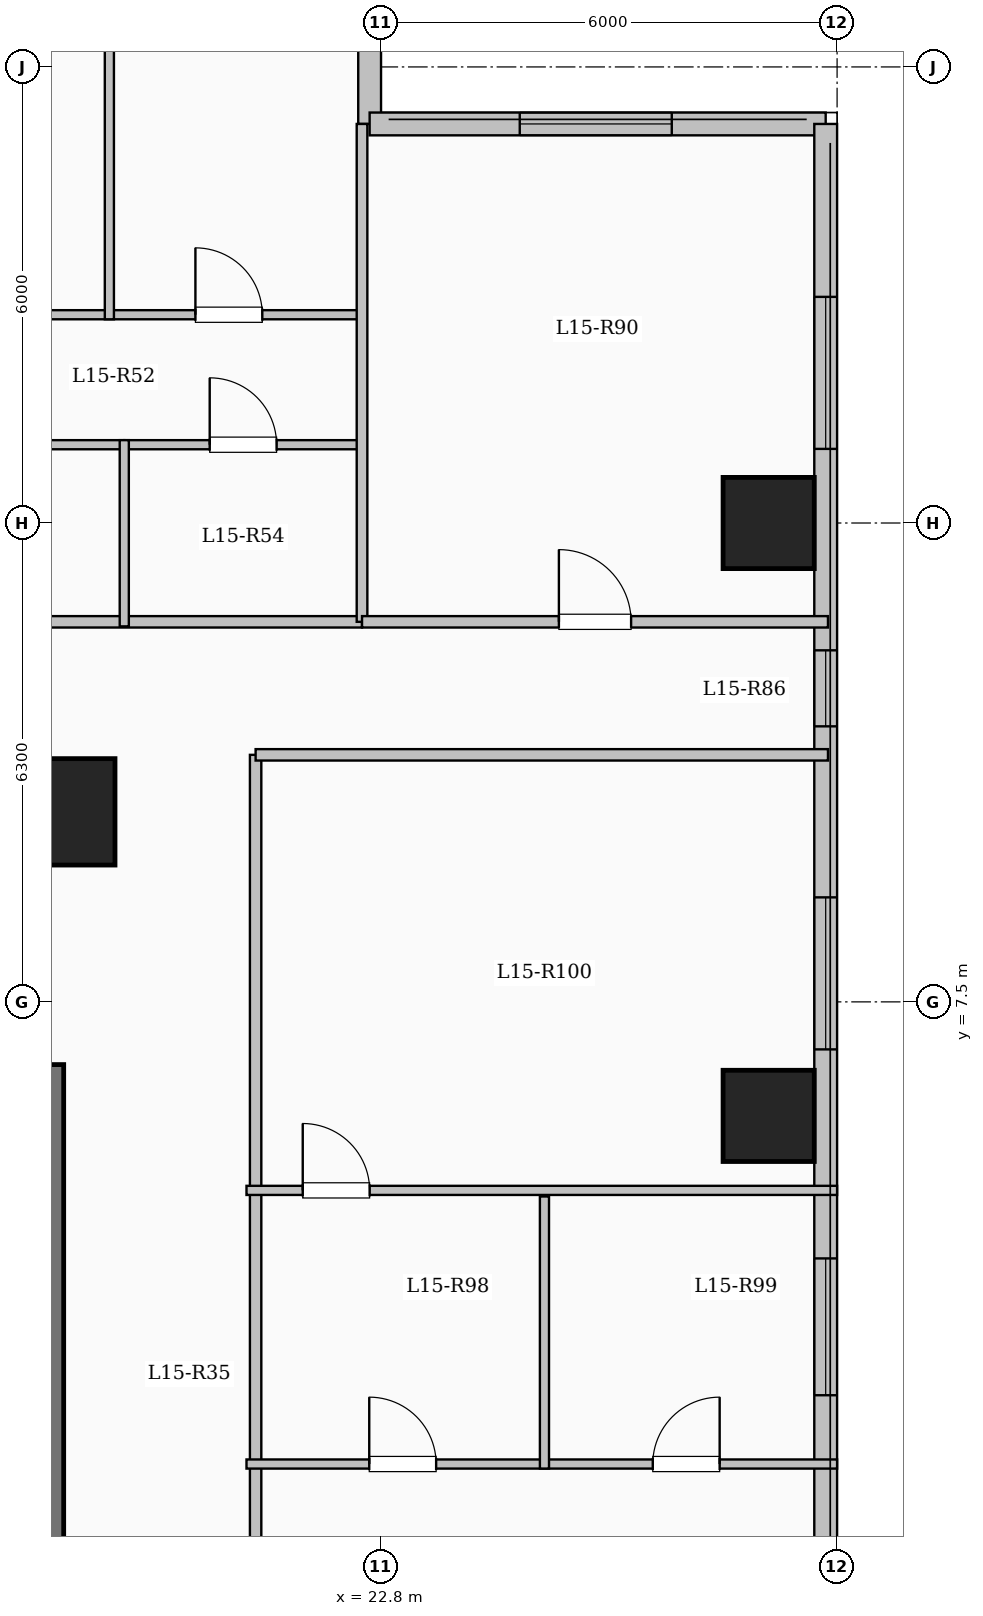
"""IFC4 building model, lengths in metres.
Left out: names, types, materials, properties, quantities, classifications, styles, units other than length and angle.
Written with IfcOpenShell. Run it as: python <this file> out.ifc"""

import sys

from ifc_helpers import new_model, si_unit, direction, frame, frame_2d, origin, origin_2d, place, context, subcontext, project, spatial, rectangle, extrude, element, fill, save


model = new_model("IFC4")
c1 = context("Model", 3, precision=1e-05, world=origin(), true_north=direction((0.0, 1.0)))
c2 = subcontext(c1, "Body", "Model", "MODEL_VIEW")
j1 = project(units=[si_unit("LENGTHUNIT", "METRE"), si_unit("PLANEANGLEUNIT", "RADIAN")], contexts=[c1])
p1 = place(None, origin())
s1 = spatial("IfcSite", under=j1, at=p1, CompositionType="ELEMENT")
p2 = place(p1, origin())
s2 = spatial("IfcBuilding", under=s1, at=p2, CompositionType="ELEMENT")
p3 = place(p2, frame((0.0, 0.0, 57.5)))
s3 = spatial("IfcBuildingStorey", under=s2, at=p3, CompositionType="ELEMENT", Elevation=57.5)
p4 = place(p3, frame((18.6, 10.0, 0.0), z_axis=(0.0, 0.0, 1.0), x_axis=(1.0, 0.0, 0.0)))
e1 = element("IfcColumn", 1, at=p4, inside=s3, PredefinedType="COLUMN", context=c2, shape_type="SweptSolid", body=[
    extrude(rectangle(XDim=1.4, YDim=1.4, at=origin_2d()), origin(), (0.0, 0.0, 1.0), 3.35),
])
for number, where, z_axis, x_axis in (
    (2, (27.9, 6.0, 0.0), (0.0, 0.0, 1.0), (1.0, 0.0, 0.0)),
    (3, (27.9, 13.8, 0.0), (0.0, 0.0, 1.0), (1.0, 0.0, 0.0)),
):
    element("IfcColumn", number, at=place(p3, frame(where, z_axis=z_axis, x_axis=x_axis)), inside=s3, PredefinedType="COLUMN", context=c2, shape_type="SweptSolid", body=[
        extrude(rectangle(XDim=1.2, YDim=1.2, at=origin_2d()), origin(), (0.0, 0.0, 1.0), 3.35),
    ])
p5 = place(p3, frame((22.65, 23.55, 0.0), z_axis=(0.0, 0.0, 1.0), x_axis=(0.0, -1.0, 0.0)))
e4 = element("IfcWall", 4, at=p5, inside=s3, PredefinedType="SOLIDWALL", context=c2, shape_type="SweptSolid", body=[
    extrude(rectangle(XDim=4.5, YDim=0.3, at=frame_2d((2.25, 0.0))), origin(), (0.0, 0.0, 1.0), 3.1),
])
p6 = place(p5, frame((1.367, 0.0, 0.9)))
e5 = element("IfcOpeningElement", 5, at=p6, cuts=e4, PredefinedType="OPENING", context=c2, shape_type="SweptSolid", body=[
    extrude(rectangle(XDim=1.8, YDim=1.65, at=frame_2d((0.9, 0.825))), frame((0.0, 0.16, 0.0), z_axis=(0.0, -1.0, 0.0), x_axis=(1.0, 0.0, 0.0)), (0.0, 0.0, 1.0), 0.32),
])
p7 = place(p3, frame((22.65, 19.05, 0.0), z_axis=(0.0, 0.0, 1.0), x_axis=(1.0, 0.0, 0.0)))
e6 = element("IfcWall", 6, at=p7, inside=s3, PredefinedType="SOLIDWALL", context=c2, shape_type="SweptSolid", body=[
    extrude(rectangle(XDim=6.0, YDim=0.3, at=frame_2d((3.0, 0.0))), origin(), (0.0, 0.0, 1.0), 3.1),
])
p8 = place(p7, frame((1.975, 0.0, 0.9)))
e7 = element("IfcOpeningElement", 7, at=p8, cuts=e6, PredefinedType="OPENING", context=c2, shape_type="SweptSolid", body=[
    extrude(rectangle(XDim=2.0, YDim=1.7, at=frame_2d((1.0, 0.85))), frame((0.0, 0.16, 0.0), z_axis=(0.0, -1.0, 0.0), x_axis=(1.0, 0.0, 0.0)), (0.0, 0.0, 1.0), 0.32),
])
p9 = place(p3, frame((28.65, 19.05, 0.0), z_axis=(0.0, 0.0, 1.0), x_axis=(0.0, -1.0, 0.0)))
e8 = element("IfcWall", 8, at=p9, inside=s3, PredefinedType="SOLIDWALL", context=c2, shape_type="SweptSolid", body=[
    extrude(rectangle(XDim=38.1, YDim=0.3, at=frame_2d((19.05, 0.0))), origin(), (0.0, 0.0, 1.0), 3.1),
])
p10 = place(p9, frame((2.275, 0.0, 0.9)))
e9 = element("IfcOpeningElement", 9, at=p10, cuts=e8, PredefinedType="OPENING", context=c2, shape_type="SweptSolid", body=[
    extrude(rectangle(XDim=2.0, YDim=1.7, at=frame_2d((1.0, 0.85))), frame((0.0, 0.16, 0.0), z_axis=(0.0, -1.0, 0.0), x_axis=(1.0, 0.0, 0.0)), (0.0, 0.0, 1.0), 0.32),
])
p11 = place(p9, frame((6.925, 0.0, 0.95)))
e10 = element("IfcOpeningElement", 10, at=p11, cuts=e8, PredefinedType="OPENING", context=c2, shape_type="SweptSolid", body=[
    extrude(rectangle(XDim=1.0, YDim=1.5, at=frame_2d((0.5, 0.75))), frame((0.0, 0.16, 0.0), z_axis=(0.0, -1.0, 0.0), x_axis=(1.0, 0.0, 0.0)), (0.0, 0.0, 1.0), 0.32),
])
p12 = place(p9, frame((10.175, 0.0, 0.9)))
e11 = element("IfcOpeningElement", 11, at=p12, cuts=e8, PredefinedType="OPENING", context=c2, shape_type="SweptSolid", body=[
    extrude(rectangle(XDim=2.0, YDim=1.7, at=frame_2d((1.0, 0.85))), frame((0.0, 0.16, 0.0), z_axis=(0.0, -1.0, 0.0), x_axis=(1.0, 0.0, 0.0)), (0.0, 0.0, 1.0), 0.32),
])
p13 = place(p9, frame((14.925, 0.0, 0.9)))
e12 = element("IfcOpeningElement", 12, at=p13, cuts=e8, PredefinedType="OPENING", context=c2, shape_type="SweptSolid", body=[
    extrude(rectangle(XDim=1.8, YDim=1.65, at=frame_2d((0.9, 0.825))), frame((0.0, 0.16, 0.0), z_axis=(0.0, -1.0, 0.0), x_axis=(1.0, 0.0, 0.0)), (0.0, 0.0, 1.0), 0.32),
])
p14 = place(p9, frame((20.75, 0.0, 0.9)))
e13 = element("IfcOpeningElement", 13, at=p14, cuts=e8, PredefinedType="OPENING", context=c2, shape_type="SweptSolid", body=[
    extrude(rectangle(XDim=2.4, YDim=1.8, at=frame_2d((1.2, 0.9))), frame((0.0, 0.16, 0.0), z_axis=(0.0, -1.0, 0.0), x_axis=(1.0, 0.0, 0.0)), (0.0, 0.0, 1.0), 0.32),
])
p15 = place(p9, frame((27.058, 0.0, 0.9)))
e14 = element("IfcOpeningElement", 14, at=p15, cuts=e8, PredefinedType="OPENING", context=c2, shape_type="SweptSolid", body=[
    extrude(rectangle(XDim=1.5, YDim=1.65, at=frame_2d((0.75, 0.825))), frame((0.0, 0.16, 0.0), z_axis=(0.0, -1.0, 0.0), x_axis=(1.0, 0.0, 0.0)), (0.0, 0.0, 1.0), 0.32),
])
p16 = place(p9, frame((32.55, 0.0, 0.9)))
e15 = element("IfcOpeningElement", 15, at=p16, cuts=e8, PredefinedType="OPENING", context=c2, shape_type="SweptSolid", body=[
    extrude(rectangle(XDim=2.4, YDim=1.8, at=frame_2d((1.2, 0.9))), frame((0.0, 0.16, 0.0), z_axis=(0.0, -1.0, 0.0), x_axis=(1.0, 0.0, 0.0)), (0.0, 0.0, 1.0), 0.32),
])
p17 = place(p3, frame((18.45, -7.375, 0.0), z_axis=(0.0, 0.0, 1.0), x_axis=(0.0, 1.0, 0.0)))
e16 = element("IfcWall", 16, at=p17, inside=s3, PredefinedType="SHEAR", context=c2, shape_type="SweptSolid", body=[
    extrude(rectangle(XDim=14.05, YDim=0.35, at=frame_2d((7.025, 0.0))), origin(), (0.0, 0.0, 1.0), 3.35),
])
p18 = place(p3, frame((3.85, 12.5, 0.0), z_axis=(0.0, 0.0, 1.0), x_axis=(1.0, 0.0, 0.0)))
e17 = element("IfcWall", 17, at=p18, inside=s3, PredefinedType="PARTITIONING", context=c2, shape_type="SweptSolid", body=[
    extrude(rectangle(XDim=18.7, YDim=0.15, at=frame_2d((9.35, 0.0))), origin(), (0.0, 0.0, 1.0), 3.1),
])
p19 = place(p18, frame((0.7, 0.0, 0.0)))
e18 = element("IfcOpeningElement", 18, at=p19, cuts=e17, PredefinedType="OPENING", context=c2, shape_type="SweptSolid", body=[
    extrude(rectangle(XDim=0.96, YDim=2.15, at=frame_2d((0.48, 1.075))), frame((0.0, 0.085, 0.0), z_axis=(0.0, -1.0, 0.0), x_axis=(1.0, 0.0, 0.0)), (0.0, 0.0, 1.0), 0.17),
])
p20 = place(p18, frame((8.4, 0.0, 0.0)))
e19 = element("IfcOpeningElement", 19, at=p20, cuts=e17, PredefinedType="OPENING", context=c2, shape_type="SweptSolid", body=[
    extrude(rectangle(XDim=0.96, YDim=2.15, at=frame_2d((0.48, 1.075))), frame((0.0, 0.085, 0.0), z_axis=(0.0, -1.0, 0.0), x_axis=(1.0, 0.0, 0.0)), (0.0, 0.0, 1.0), 0.17),
])
p21 = place(p3, frame((21.15, -7.25, 0.0), z_axis=(0.0, 0.0, 1.0), x_axis=(0.0, 1.0, 0.0)))
e20 = element("IfcWall", 20, at=p21, inside=s3, PredefinedType="PARTITIONING", context=c2, shape_type="SweptSolid", body=[
    extrude(rectangle(XDim=18.0, YDim=0.15, at=frame_2d((9.0, 0.0))), origin(), (0.0, 0.0, 1.0), 2.585),
])
p22 = place(p3, frame((15.962, 14.83, 0.0), z_axis=(0.0, 0.0, 1.0), x_axis=(1.0, 0.0, 0.0)))
e21 = element("IfcWall", 21, at=p22, inside=s3, PredefinedType="PARTITIONING", context=c2, shape_type="SweptSolid", body=[
    extrude(rectangle(XDim=3.46, YDim=0.12, at=frame_2d((1.73, 0.0))), origin(), (0.0, 0.0, 1.0), 3.1),
])
p23 = place(p22, frame((1.29, 0.0, 0.0)))
e22 = element("IfcOpeningElement", 22, at=p23, cuts=e21, PredefinedType="OPENING", context=c2, shape_type="SweptSolid", body=[
    extrude(rectangle(XDim=0.88, YDim=2.1, at=frame_2d((0.44, 1.05))), frame((0.0, 0.07, 0.0), z_axis=(0.0, -1.0, 0.0), x_axis=(1.0, 0.0, 0.0)), (0.0, 0.0, 1.0), 0.14),
])
p24 = place(p3, frame((19.422, 14.83, 0.0), z_axis=(0.0, 0.0, 1.0), x_axis=(1.0, 0.0, 0.0)))
e23 = element("IfcWall", 23, at=p24, inside=s3, PredefinedType="PARTITIONING", context=c2, shape_type="SweptSolid", body=[
    extrude(rectangle(XDim=3.128, YDim=0.12, at=frame_2d((1.564, 0.0))), origin(), (0.0, 0.0, 1.0), 3.1),
])
p25 = place(p24, frame((1.124, 0.0, 0.0)))
e24 = element("IfcOpeningElement", 24, at=p25, cuts=e23, PredefinedType="OPENING", context=c2, shape_type="SweptSolid", body=[
    extrude(rectangle(XDim=0.88, YDim=2.1, at=frame_2d((0.44, 1.05))), frame((0.0, 0.07, 0.0), z_axis=(0.0, -1.0, 0.0), x_axis=(1.0, 0.0, 0.0)), (0.0, 0.0, 1.0), 0.14),
])
p26 = place(p3, frame((15.902, 16.54, 0.0), z_axis=(0.0, 0.0, 1.0), x_axis=(1.0, 0.0, 0.0)))
e25 = element("IfcWall", 25, at=p26, inside=s3, PredefinedType="PARTITIONING", context=c2, shape_type="SweptSolid", body=[
    extrude(rectangle(XDim=6.708, YDim=0.12, at=frame_2d((3.354, 0.0))), origin(), (0.0, 0.0, 1.0), 3.1),
])
p27 = place(p26, frame((1.192, 0.0, 0.0)))
e26 = element("IfcOpeningElement", 26, at=p27, cuts=e25, PredefinedType="OPENING", context=c2, shape_type="SweptSolid", body=[
    extrude(rectangle(XDim=0.88, YDim=2.1, at=frame_2d((0.44, 1.05))), frame((0.0, 0.07, 0.0), z_axis=(0.0, -1.0, 0.0), x_axis=(1.0, 0.0, 0.0)), (0.0, 0.0, 1.0), 0.14),
])
p28 = place(p26, frame((4.456, 0.0, 0.0)))
e27 = element("IfcOpeningElement", 27, at=p28, cuts=e25, PredefinedType="OPENING", context=c2, shape_type="SweptSolid", body=[
    extrude(rectangle(XDim=0.88, YDim=2.1, at=frame_2d((0.44, 1.05))), frame((0.0, 0.07, 0.0), z_axis=(0.0, -1.0, 0.0), x_axis=(1.0, 0.0, 0.0)), (0.0, 0.0, 1.0), 0.14),
])
p29 = place(p3, frame((19.422, 12.44, 0.0), z_axis=(0.0, 0.0, 1.0), x_axis=(0.0, 1.0, 0.0)))
e28 = element("IfcWall", 28, at=p29, inside=s3, PredefinedType="PARTITIONING", context=c2, shape_type="SweptSolid", body=[
    extrude(rectangle(XDim=2.45, YDim=0.12, at=frame_2d((1.225, 0.0))), origin(), (0.0, 0.0, 1.0), 3.1),
])
p30 = place(p3, frame((19.226, 16.48, 0.0), z_axis=(0.0, 0.0, 1.0), x_axis=(0.0, 1.0, 0.0)))
e29 = element("IfcWall", 29, at=p30, inside=s3, PredefinedType="PARTITIONING", context=c2, shape_type="SweptSolid", body=[
    extrude(rectangle(XDim=7.12, YDim=0.12, at=frame_2d((3.56, 0.0))), origin(), (0.0, 0.0, 1.0), 3.1),
])
p31 = place(p3, frame((21.15, 10.75, 0.0), z_axis=(0.0, 0.0, 1.0), x_axis=(1.0, 0.0, 0.0)))
e30 = element("IfcWall", 30, at=p31, inside=s3, PredefinedType="PARTITIONING", context=c2, shape_type="SweptSolid", body=[
    extrude(rectangle(XDim=7.53, YDim=0.15, at=frame_2d((3.765, 0.0))), origin(), (0.0, 0.0, 1.0), 3.1),
])
p32 = place(p3, frame((22.55, 12.5, 0.0), z_axis=(0.0, 0.0, 1.0), x_axis=(0.0, 1.0, 0.0)))
e31 = element("IfcWall", 31, at=p32, inside=s3, PredefinedType="PARTITIONING", context=c2, shape_type="SweptSolid", body=[
    extrude(rectangle(XDim=6.55, YDim=0.14, at=frame_2d((3.275, 0.0))), origin(), (0.0, 0.0, 1.0), 3.1),
])
p33 = place(p3, frame((22.55, 12.5, 0.0), z_axis=(0.0, 0.0, 1.0), x_axis=(1.0, 0.0, 0.0)))
e32 = element("IfcWall", 32, at=p33, inside=s3, PredefinedType="PARTITIONING", context=c2, shape_type="SweptSolid", body=[
    extrude(rectangle(XDim=6.13, YDim=0.15, at=frame_2d((3.065, 0.0))), origin(), (0.0, 0.0, 1.0), 3.1),
])
p34 = place(p33, frame((2.59, 0.0, 0.0)))
e33 = element("IfcOpeningElement", 33, at=p34, cuts=e32, PredefinedType="OPENING", context=c2, shape_type="SweptSolid", body=[
    extrude(rectangle(XDim=0.95, YDim=2.15, at=frame_2d((0.475, 1.075))), frame((0.0, 0.085, 0.0), z_axis=(0.0, -1.0, 0.0), x_axis=(1.0, 0.0, 0.0)), (0.0, 0.0, 1.0), 0.17),
])
p35 = place(p3, frame((21.03, 1.42, 0.0), z_axis=(0.0, 0.0, 1.0), x_axis=(1.0, 0.0, 0.0)))
e34 = element("IfcWall", 34, at=p35, inside=s3, PredefinedType="PARTITIONING", context=c2, shape_type="SweptSolid", body=[
    extrude(rectangle(XDim=7.77, YDim=0.12, at=frame_2d((3.885, 0.0))), origin(), (0.0, 0.0, 1.0), 3.1),
])
p36 = place(p35, frame((1.615, 0.0, 0.0)))
e35 = element("IfcOpeningElement", 35, at=p36, cuts=e34, PredefinedType="OPENING", context=c2, shape_type="SweptSolid", body=[
    extrude(rectangle(XDim=0.88, YDim=2.1, at=frame_2d((0.44, 1.05))), frame((0.0, 0.07, 0.0), z_axis=(0.0, -1.0, 0.0), x_axis=(1.0, 0.0, 0.0)), (0.0, 0.0, 1.0), 0.14),
])
p37 = place(p35, frame((5.345, 0.0, 0.0)))
e36 = element("IfcOpeningElement", 36, at=p37, cuts=e34, PredefinedType="OPENING", context=c2, shape_type="SweptSolid", body=[
    extrude(rectangle(XDim=0.88, YDim=2.1, at=frame_2d((0.44, 1.05))), frame((0.0, 0.07, 0.0), z_axis=(0.0, -1.0, 0.0), x_axis=(1.0, 0.0, 0.0)), (0.0, 0.0, 1.0), 0.14),
])
p38 = place(p3, frame((21.03, 5.02, 0.0), z_axis=(0.0, 0.0, 1.0), x_axis=(1.0, 0.0, 0.0)))
e37 = element("IfcWall", 37, at=p38, inside=s3, PredefinedType="PARTITIONING", context=c2, shape_type="SweptSolid", body=[
    extrude(rectangle(XDim=7.77, YDim=0.12, at=frame_2d((3.885, 0.0))), origin(), (0.0, 0.0, 1.0), 3.1),
])
p39 = place(p38, frame((0.74, 0.0, 0.0)))
e38 = element("IfcOpeningElement", 38, at=p39, cuts=e37, PredefinedType="OPENING", context=c2, shape_type="SweptSolid", body=[
    extrude(rectangle(XDim=0.88, YDim=2.1, at=frame_2d((0.44, 1.05))), frame((0.0, 0.07, 0.0), z_axis=(0.0, -1.0, 0.0), x_axis=(1.0, 0.0, 0.0)), (0.0, 0.0, 1.0), 0.14),
])
p40 = place(p3, frame((24.95, 1.36, 0.0), z_axis=(0.0, 0.0, 1.0), x_axis=(0.0, 1.0, 0.0)))
e39 = element("IfcWall", 39, at=p40, inside=s3, PredefinedType="PARTITIONING", context=c2, shape_type="SweptSolid", body=[
    extrude(rectangle(XDim=3.58, YDim=0.12, at=frame_2d((1.79, 0.0))), origin(), (0.0, 0.0, 1.0), 3.1),
])
p41 = place(p8, origin())
e40 = element("IfcWindow", 40, at=p41, inside=s3, PartitioningType="SINGLE_PANEL", PredefinedType="WINDOW", context=c2, shape_type="SweptSolid", body=[
    extrude(rectangle(XDim=2.0, YDim=1.7, at=frame_2d((1.0, 0.85))), frame((0.0, 0.03, 0.0), z_axis=(0.0, -1.0, 0.0), x_axis=(1.0, 0.0, 0.0)), (0.0, 0.0, 1.0), 0.06),
])
fill(e7, e40)
p42 = place(p10, origin())
e41 = element("IfcWindow", 41, at=p42, inside=s3, PartitioningType="SINGLE_PANEL", PredefinedType="WINDOW", context=c2, shape_type="SweptSolid", body=[
    extrude(rectangle(XDim=2.0, YDim=1.7, at=frame_2d((1.0, 0.85))), frame((0.0, 0.03, 0.0), z_axis=(0.0, -1.0, 0.0), x_axis=(1.0, 0.0, 0.0)), (0.0, 0.0, 1.0), 0.06),
])
fill(e9, e41)
p43 = place(p11, origin())
e42 = element("IfcWindow", 42, at=p43, inside=s3, PartitioningType="SINGLE_PANEL", PredefinedType="WINDOW", context=c2, shape_type="SweptSolid", body=[
    extrude(rectangle(XDim=1.0, YDim=1.5, at=frame_2d((0.5, 0.75))), frame((0.0, 0.03, 0.0), z_axis=(0.0, -1.0, 0.0), x_axis=(1.0, 0.0, 0.0)), (0.0, 0.0, 1.0), 0.06),
])
fill(e10, e42)
p44 = place(p12, origin())
e43 = element("IfcWindow", 43, at=p44, inside=s3, PartitioningType="SINGLE_PANEL", PredefinedType="WINDOW", context=c2, shape_type="SweptSolid", body=[
    extrude(rectangle(XDim=2.0, YDim=1.7, at=frame_2d((1.0, 0.85))), frame((0.0, 0.03, 0.0), z_axis=(0.0, -1.0, 0.0), x_axis=(1.0, 0.0, 0.0)), (0.0, 0.0, 1.0), 0.06),
])
fill(e11, e43)
p45 = place(p13, origin())
e44 = element("IfcWindow", 44, at=p45, inside=s3, PartitioningType="SINGLE_PANEL", PredefinedType="WINDOW", context=c2, shape_type="SweptSolid", body=[
    extrude(rectangle(XDim=1.8, YDim=1.65, at=frame_2d((0.9, 0.825))), frame((0.0, 0.03, 0.0), z_axis=(0.0, -1.0, 0.0), x_axis=(1.0, 0.0, 0.0)), (0.0, 0.0, 1.0), 0.06),
])
fill(e12, e44)
p46 = place(p25, origin())
e45 = element("IfcDoor", 45, at=p46, inside=s3, OperationType="SINGLE_SWING_LEFT", PredefinedType="DOOR", context=c2, shape_type="SweptSolid", body=[
    extrude(rectangle(XDim=0.88, YDim=2.1, at=frame_2d((0.44, 1.05))), frame((0.0, 0.025, 0.0), z_axis=(0.0, -1.0, 0.0), x_axis=(1.0, 0.0, 0.0)), (0.0, 0.0, 1.0), 0.05),
])
fill(e24, e45)
p47 = place(p28, origin())
e46 = element("IfcDoor", 46, at=p47, inside=s3, OperationType="SINGLE_SWING_LEFT", PredefinedType="DOOR", context=c2, shape_type="SweptSolid", body=[
    extrude(rectangle(XDim=0.88, YDim=2.1, at=frame_2d((0.44, 1.05))), frame((0.0, 0.025, 0.0), z_axis=(0.0, -1.0, 0.0), x_axis=(1.0, 0.0, 0.0)), (0.0, 0.0, 1.0), 0.05),
])
fill(e27, e46)
p48 = place(p34, origin())
e47 = element("IfcDoor", 47, at=p48, inside=s3, OperationType="SINGLE_SWING_LEFT", PredefinedType="DOOR", context=c2, shape_type="SweptSolid", body=[
    extrude(rectangle(XDim=0.95, YDim=2.15, at=frame_2d((0.475, 1.075))), frame((0.0, 0.025, 0.0), z_axis=(0.0, -1.0, 0.0), x_axis=(1.0, 0.0, 0.0)), (0.0, 0.0, 1.0), 0.05),
])
fill(e33, e47)
p49 = place(p36, origin())
e48 = element("IfcDoor", 48, at=p49, inside=s3, OperationType="SINGLE_SWING_LEFT", PredefinedType="DOOR", context=c2, shape_type="SweptSolid", body=[
    extrude(rectangle(XDim=0.88, YDim=2.1, at=frame_2d((0.44, 1.05))), frame((0.0, 0.025, 0.0), z_axis=(0.0, -1.0, 0.0), x_axis=(1.0, 0.0, 0.0)), (0.0, 0.0, 1.0), 0.05),
])
fill(e35, e48)
p50 = place(p37, origin())
e49 = element("IfcDoor", 49, at=p50, inside=s3, OperationType="SINGLE_SWING_RIGHT", PredefinedType="DOOR", context=c2, shape_type="SweptSolid", body=[
    extrude(rectangle(XDim=0.88, YDim=2.1, at=frame_2d((0.44, 1.05))), frame((0.0, 0.025, 0.0), z_axis=(0.0, -1.0, 0.0), x_axis=(1.0, 0.0, 0.0)), (0.0, 0.0, 1.0), 0.05),
])
fill(e36, e49)
p51 = place(p39, origin())
e50 = element("IfcDoor", 50, at=p51, inside=s3, OperationType="SINGLE_SWING_LEFT", PredefinedType="DOOR", context=c2, shape_type="SweptSolid", body=[
    extrude(rectangle(XDim=0.88, YDim=2.1, at=frame_2d((0.44, 1.05))), frame((0.0, 0.025, 0.0), z_axis=(0.0, -1.0, 0.0), x_axis=(1.0, 0.0, 0.0)), (0.0, 0.0, 1.0), 0.05),
])
fill(e38, e50)
save(model, sys.argv[1])
